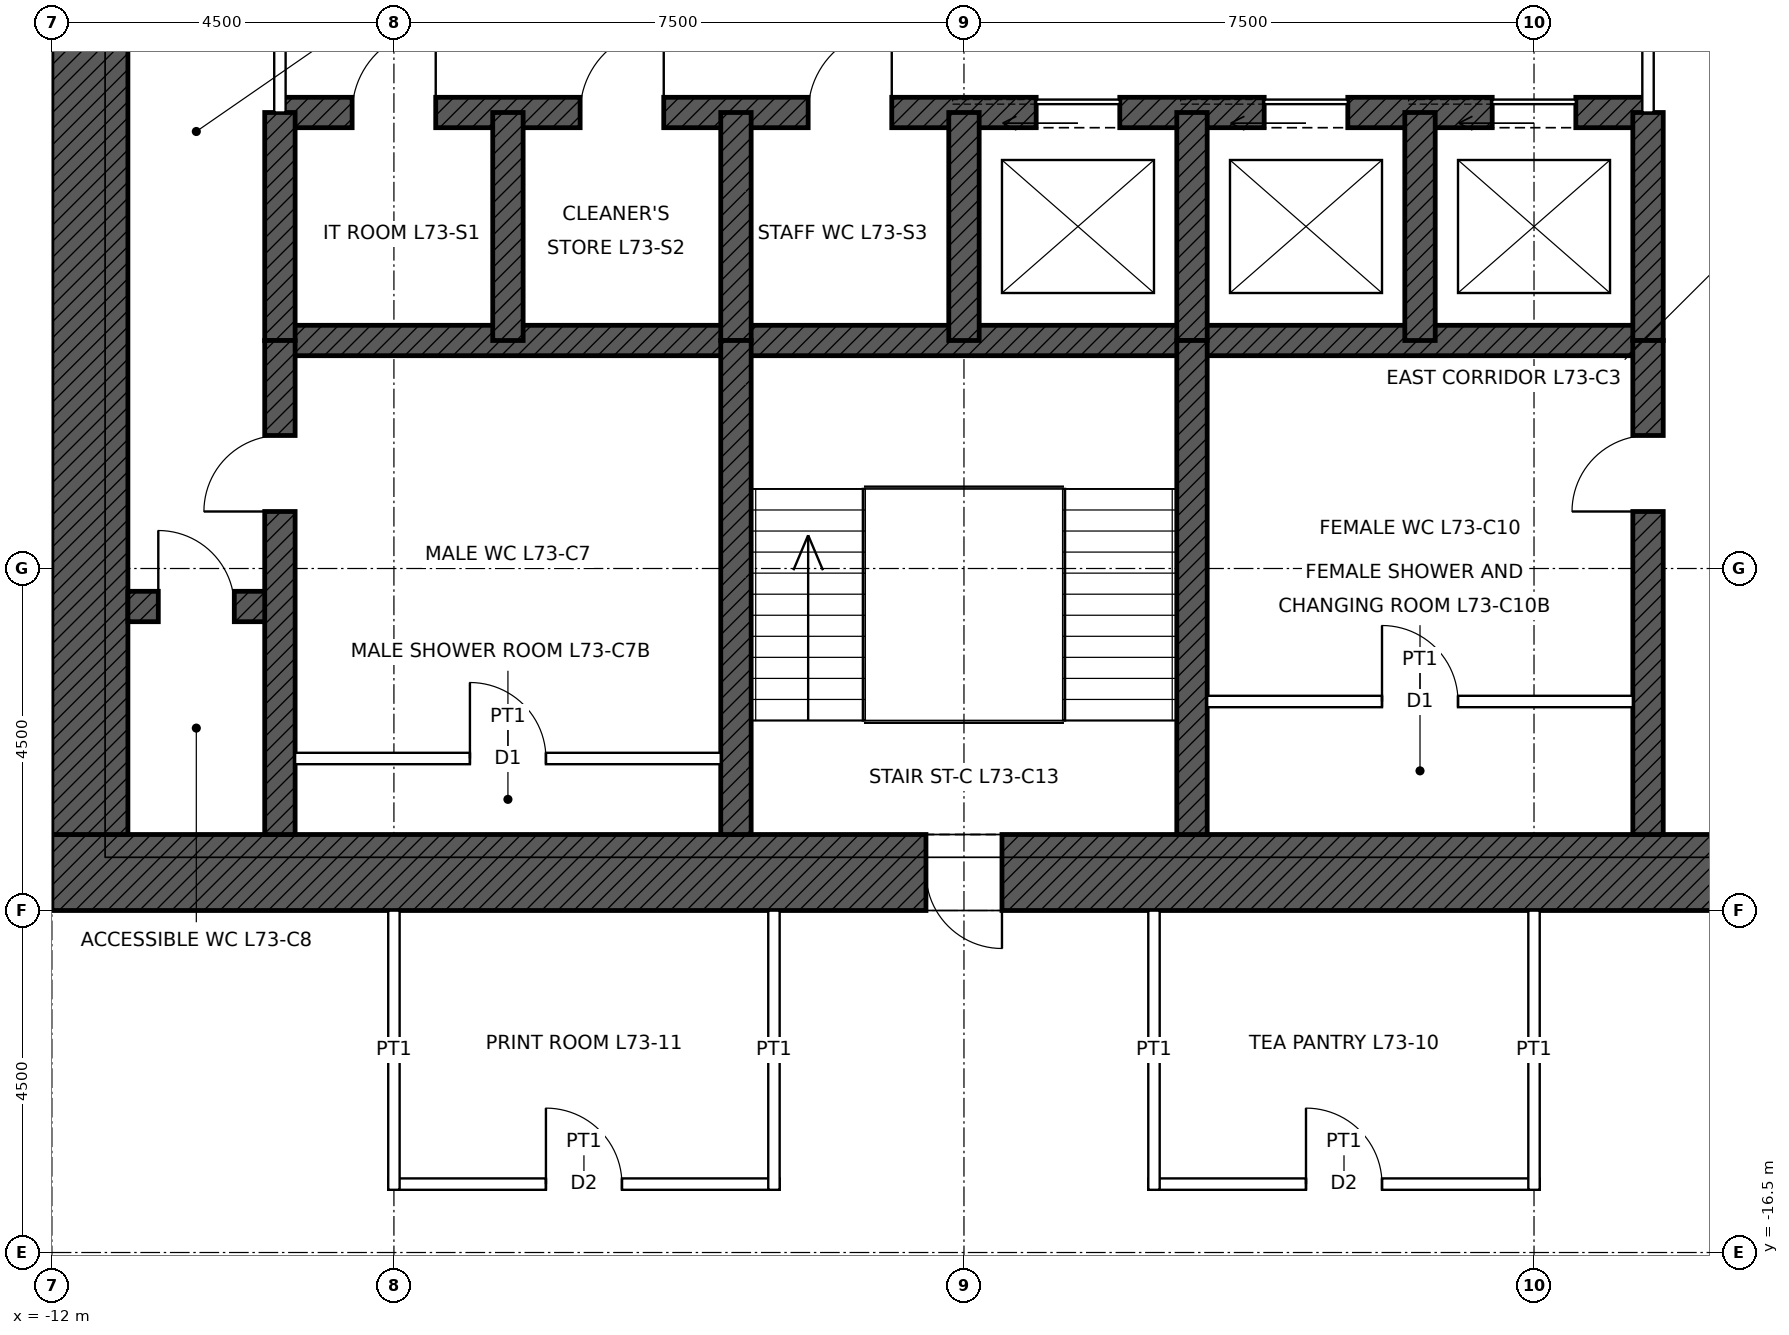
"""IFC4 building model, lengths in metres.
Left out: names, types, materials, properties, quantities, classifications, styles, units other than length and angle.
Written with IfcOpenShell. Run it as: python <this file> out.ifc"""

import sys

from ifc_helpers import new_model, si_unit, direction, frame, frame_2d, origin, place, context, subcontext, project, spatial, rectangle, extrude, element, fill, save


model = new_model("IFC4")
c1 = context("Model", 3, precision=1e-05, world=origin(), true_north=direction((0.0, 1.0)))
c2 = subcontext(c1, "Body", "Model", "MODEL_VIEW")
j1 = project(units=[si_unit("LENGTHUNIT", "METRE"), si_unit("PLANEANGLEUNIT", "RADIAN")], contexts=[c1])
p1 = place(None, origin())
s1 = spatial("IfcSite", under=j1, at=p1, CompositionType="ELEMENT")
p2 = place(p1, origin())
s2 = spatial("IfcBuilding", under=s1, at=p2, CompositionType="ELEMENT")
p3 = place(p2, frame((0.0, 0.0, 327.9)))
s3 = spatial("IfcBuildingStorey", under=s2, at=p3, CompositionType="ELEMENT", Elevation=327.9)
p4 = place(p3, frame((12.0, -11.5, 0.0), z_axis=(0.0, 0.0, 1.0), x_axis=(-1.0, 0.0, 0.0)))
e1 = element("IfcWall", 1, at=p4, inside=s3, PredefinedType="SHEAR", context=c2, shape_type="SweptSolid", body=[
    extrude(rectangle(XDim=24.0, YDim=1.0, at=frame_2d((12.0, 0.0))), origin(), (0.0, 0.0, 1.0), 4.0),
])
p5 = place(p4, frame((11.5, 0.0, 0.0)))
e2 = element("IfcOpeningElement", 2, at=p5, cuts=e1, PredefinedType="OPENING", context=c2, shape_type="SweptSolid", body=[
    extrude(rectangle(XDim=1.0, YDim=2.1, at=frame_2d((0.5, 1.05))), frame((0.0, 0.51, 0.0), z_axis=(0.0, -1.0, 0.0), x_axis=(1.0, 0.0, 0.0)), (0.0, 0.0, 1.0), 1.02),
])
p6 = place(p4, frame((1.0, 0.0, 0.0)))
e3 = element("IfcOpeningElement", 3, at=p6, cuts=e1, PredefinedType="OPENING", context=c2, shape_type="SweptSolid", body=[
    extrude(rectangle(XDim=1.0, YDim=2.4, at=frame_2d((0.5, 1.2))), frame((0.0, 0.51, 0.0), z_axis=(0.0, -1.0, 0.0), x_axis=(1.0, 0.0, 0.0)), (0.0, 0.0, 1.0), 1.02),
])
p7 = place(p3, frame((-11.5, -11.0, 0.0), z_axis=(0.0, 0.0, 1.0), x_axis=(0.0, 1.0, 0.0)))
e4 = element("IfcWall", 4, at=p7, inside=s3, PredefinedType="SHEAR", context=c2, shape_type="SweptSolid", body=[
    extrude(rectangle(XDim=22.0, YDim=1.0, at=frame_2d((11.0, 0.0))), origin(), (0.0, 0.0, 1.0), 4.0),
])
p8 = place(p7, frame((10.5, 0.0, 0.0)))
e5 = element("IfcOpeningElement", 5, at=p8, cuts=e4, PredefinedType="OPENING", context=c2, shape_type="SweptSolid", body=[
    extrude(rectangle(XDim=1.0, YDim=2.4, at=frame_2d((0.5, 1.2))), frame((0.0, 0.51, 0.0), z_axis=(0.0, -1.0, 0.0), x_axis=(1.0, 0.0, 0.0)), (0.0, 0.0, 1.0), 1.02),
])
p9 = place(p3, frame((-9.0, -1.5, 0.0), z_axis=(0.0, 0.0, 1.0), x_axis=(1.0, 0.0, 0.0)))
e6 = element("IfcWall", 6, at=p9, inside=s3, PredefinedType="SHEAR", context=c2, shape_type="SweptSolid", body=[
    extrude(rectangle(XDim=18.0, YDim=0.4, at=frame_2d((9.0, 0.0))), origin(), (0.0, 0.0, 1.0), 4.0),
])
p10 = place(p9, frame((9.95, 0.0, 0.0)))
e7 = element("IfcOpeningElement", 7, at=p10, cuts=e6, PredefinedType="OPENING", context=c2, shape_type="SweptSolid", body=[
    extrude(rectangle(XDim=1.1, YDim=2.1, at=frame_2d((0.55, 1.05))), frame((0.0, 0.21, 0.0), z_axis=(0.0, -1.0, 0.0), x_axis=(1.0, 0.0, 0.0)), (0.0, 0.0, 1.0), 0.42),
])
p11 = place(p9, frame((12.95, 0.0, 0.0)))
e8 = element("IfcOpeningElement", 8, at=p11, cuts=e6, PredefinedType="OPENING", context=c2, shape_type="SweptSolid", body=[
    extrude(rectangle(XDim=1.1, YDim=2.1, at=frame_2d((0.55, 1.05))), frame((0.0, 0.21, 0.0), z_axis=(0.0, -1.0, 0.0), x_axis=(1.0, 0.0, 0.0)), (0.0, 0.0, 1.0), 0.42),
])
p12 = place(p9, frame((15.95, 0.0, 0.0)))
e9 = element("IfcOpeningElement", 9, at=p12, cuts=e6, PredefinedType="OPENING", context=c2, shape_type="SweptSolid", body=[
    extrude(rectangle(XDim=1.1, YDim=2.1, at=frame_2d((0.55, 1.05))), frame((0.0, 0.21, 0.0), z_axis=(0.0, -1.0, 0.0), x_axis=(1.0, 0.0, 0.0)), (0.0, 0.0, 1.0), 0.42),
])
p13 = place(p9, frame((0.95, 0.0, 0.0)))
e10 = element("IfcOpeningElement", 10, at=p13, cuts=e6, PredefinedType="OPENING", context=c2, shape_type="SweptSolid", body=[
    extrude(rectangle(XDim=1.1, YDim=2.1, at=frame_2d((0.55, 1.05))), frame((0.0, 0.21, 0.0), z_axis=(0.0, -1.0, 0.0), x_axis=(1.0, 0.0, 0.0)), (0.0, 0.0, 1.0), 0.42),
])
p14 = place(p9, frame((3.95, 0.0, 0.0)))
e11 = element("IfcOpeningElement", 11, at=p14, cuts=e6, PredefinedType="OPENING", context=c2, shape_type="SweptSolid", body=[
    extrude(rectangle(XDim=1.1, YDim=2.1, at=frame_2d((0.55, 1.05))), frame((0.0, 0.21, 0.0), z_axis=(0.0, -1.0, 0.0), x_axis=(1.0, 0.0, 0.0)), (0.0, 0.0, 1.0), 0.42),
])
p15 = place(p9, frame((6.95, 0.0, 0.0)))
e12 = element("IfcOpeningElement", 12, at=p15, cuts=e6, PredefinedType="OPENING", context=c2, shape_type="SweptSolid", body=[
    extrude(rectangle(XDim=1.1, YDim=2.1, at=frame_2d((0.55, 1.05))), frame((0.0, 0.21, 0.0), z_axis=(0.0, -1.0, 0.0), x_axis=(1.0, 0.0, 0.0)), (0.0, 0.0, 1.0), 0.42),
])
p16 = place(p3, frame((-9.0, -4.5, 0.0), z_axis=(0.0, 0.0, 1.0), x_axis=(1.0, 0.0, 0.0)))
e13 = element("IfcWall", 13, at=p16, inside=s3, PredefinedType="SHEAR", context=c2, shape_type="SweptSolid", body=[
    extrude(rectangle(XDim=18.0, YDim=0.4, at=frame_2d((9.0, 0.0))), origin(), (0.0, 0.0, 1.0), 4.0),
])
p17 = place(p3, frame((-11.0, -8.0, 0.0), z_axis=(0.0, 0.0, 1.0), x_axis=(1.0, 0.0, 0.0)))
e14 = element("IfcWall", 14, at=p17, inside=s3, PredefinedType="SHEAR", context=c2, shape_type="SweptSolid", body=[
    extrude(rectangle(XDim=2.0, YDim=0.4, at=frame_2d((1.0, 0.0))), origin(), (0.0, 0.0, 1.0), 4.0),
])
p18 = place(p17, frame((0.4, 0.0, 0.0)))
e15 = element("IfcOpeningElement", 15, at=p18, cuts=e14, PredefinedType="OPENING", context=c2, shape_type="SweptSolid", body=[
    extrude(rectangle(XDim=1.0, YDim=2.1, at=frame_2d((0.5, 1.05))), frame((0.0, 0.21, 0.0), z_axis=(0.0, -1.0, 0.0), x_axis=(1.0, 0.0, 0.0)), (0.0, 0.0, 1.0), 0.42),
])
for number, where, z_axis, x_axis in (
    (16, (-9.0, -4.5, 0.0), (0.0, 0.0, 1.0), (0.0, 1.0, 0.0)),
    (17, (9.0, -4.5, 0.0), (0.0, 0.0, 1.0), (0.0, 1.0, 0.0)),
    (18, (-6.0, -4.5, 0.0), (0.0, 0.0, 1.0), (0.0, 1.0, 0.0)),
    (19, (-3.0, -4.5, 0.0), (0.0, 0.0, 1.0), (0.0, 1.0, 0.0)),
    (20, (0.0, -4.5, 0.0), (0.0, 0.0, 1.0), (0.0, 1.0, 0.0)),
    (21, (3.0, -4.5, 0.0), (0.0, 0.0, 1.0), (0.0, 1.0, 0.0)),
    (22, (6.0, -4.5, 0.0), (0.0, 0.0, 1.0), (0.0, 1.0, 0.0)),
):
    element("IfcWall", number, at=place(p3, frame(where, z_axis=z_axis, x_axis=x_axis)), inside=s3, PredefinedType="SHEAR", context=c2, shape_type="SweptSolid", body=[
        extrude(rectangle(XDim=3.0, YDim=0.4, at=frame_2d((1.5, 0.0))), origin(), (0.0, 0.0, 1.0), 4.0),
    ])
p19 = place(p3, frame((-9.0, -11.0, 0.0), z_axis=(0.0, 0.0, 1.0), x_axis=(0.0, 1.0, 0.0)))
e23 = element("IfcWall", 23, at=p19, inside=s3, PredefinedType="SHEAR", context=c2, shape_type="SweptSolid", body=[
    extrude(rectangle(XDim=6.5, YDim=0.4, at=frame_2d((3.25, 0.0))), origin(), (0.0, 0.0, 1.0), 4.0),
])
p20 = place(p19, frame((4.25, 0.0, 0.0)))
e24 = element("IfcOpeningElement", 24, at=p20, cuts=e23, PredefinedType="OPENING", context=c2, shape_type="SweptSolid", body=[
    extrude(rectangle(XDim=1.0, YDim=2.1, at=frame_2d((0.5, 1.05))), frame((0.0, 0.21, 0.0), z_axis=(0.0, -1.0, 0.0), x_axis=(1.0, 0.0, 0.0)), (0.0, 0.0, 1.0), 0.42),
])
p21 = place(p3, frame((9.0, -11.0, 0.0), z_axis=(0.0, 0.0, 1.0), x_axis=(0.0, 1.0, 0.0)))
e25 = element("IfcWall", 25, at=p21, inside=s3, PredefinedType="SHEAR", context=c2, shape_type="SweptSolid", body=[
    extrude(rectangle(XDim=6.5, YDim=0.4, at=frame_2d((3.25, 0.0))), origin(), (0.0, 0.0, 1.0), 4.0),
])
p22 = place(p21, frame((4.25, 0.0, 0.0)))
e26 = element("IfcOpeningElement", 26, at=p22, cuts=e25, PredefinedType="OPENING", context=c2, shape_type="SweptSolid", body=[
    extrude(rectangle(XDim=1.0, YDim=2.1, at=frame_2d((0.5, 1.05))), frame((0.0, 0.21, 0.0), z_axis=(0.0, -1.0, 0.0), x_axis=(1.0, 0.0, 0.0)), (0.0, 0.0, 1.0), 0.42),
])
for number, where, z_axis, x_axis in (
    (27, (-3.0, -11.0, 0.0), (0.0, 0.0, 1.0), (0.0, 1.0, 0.0)),
    (28, (3.0, -11.0, 0.0), (0.0, 0.0, 1.0), (0.0, 1.0, 0.0)),
):
    element("IfcWall", number, at=place(p3, frame(where, z_axis=z_axis, x_axis=x_axis)), inside=s3, PredefinedType="SHEAR", context=c2, shape_type="SweptSolid", body=[
        extrude(rectangle(XDim=6.5, YDim=0.4, at=frame_2d((3.25, 0.0))), origin(), (0.0, 0.0, 1.0), 4.0),
    ])
p23 = place(p3, frame((-7.575, -15.6, 0.0), z_axis=(0.0, 0.0, 1.0), x_axis=(1.0, 0.0, 0.0)))
e29 = element("IfcWall", 29, at=p23, inside=s3, PredefinedType="PARTITIONING", context=c2, shape_type="SweptSolid", body=[
    extrude(rectangle(XDim=5.15, YDim=0.15, at=frame_2d((2.575, 0.0))), origin(), (0.0, 0.0, 1.0), 3.85),
])
p24 = place(p23, frame((2.075, 0.0, 0.0)))
e30 = element("IfcOpeningElement", 30, at=p24, cuts=e29, PredefinedType="OPENING", context=c2, shape_type="SweptSolid", body=[
    extrude(rectangle(XDim=1.0, YDim=2.1, at=frame_2d((0.5, 1.05))), frame((0.0, 0.085, 0.0), z_axis=(0.0, -1.0, 0.0), x_axis=(1.0, 0.0, 0.0)), (0.0, 0.0, 1.0), 0.17),
])
p25 = place(p3, frame((2.425, -15.6, 0.0), z_axis=(0.0, 0.0, 1.0), x_axis=(1.0, 0.0, 0.0)))
e31 = element("IfcWall", 31, at=p25, inside=s3, PredefinedType="PARTITIONING", context=c2, shape_type="SweptSolid", body=[
    extrude(rectangle(XDim=5.15, YDim=0.15, at=frame_2d((2.575, 0.0))), origin(), (0.0, 0.0, 1.0), 3.85),
])
p26 = place(p25, frame((2.075, 0.0, 0.0)))
e32 = element("IfcOpeningElement", 32, at=p26, cuts=e31, PredefinedType="OPENING", context=c2, shape_type="SweptSolid", body=[
    extrude(rectangle(XDim=1.0, YDim=2.1, at=frame_2d((0.5, 1.05))), frame((0.0, 0.085, 0.0), z_axis=(0.0, -1.0, 0.0), x_axis=(1.0, 0.0, 0.0)), (0.0, 0.0, 1.0), 0.17),
])
p27 = place(p3, frame((-7.5, -15.675, 0.0), z_axis=(0.0, 0.0, 1.0), x_axis=(0.0, 1.0, 0.0)))
e33 = element("IfcWall", 33, at=p27, inside=s3, PredefinedType="PARTITIONING", context=c2, shape_type="SweptSolid", body=[
    extrude(rectangle(XDim=3.675, YDim=0.15, at=frame_2d((1.837, 0.0))), origin(), (0.0, 0.0, 1.0), 3.243),
])
for number, where, z_axis, x_axis in (
    (34, (-2.5, -15.675, 0.0), (0.0, 0.0, 1.0), (0.0, 1.0, 0.0)),
    (35, (2.5, -15.675, 0.0), (0.0, 0.0, 1.0), (0.0, 1.0, 0.0)),
):
    element("IfcWall", number, at=place(p3, frame(where, z_axis=z_axis, x_axis=x_axis)), inside=s3, PredefinedType="PARTITIONING", context=c2, shape_type="SweptSolid", body=[
        extrude(rectangle(XDim=3.675, YDim=0.15, at=frame_2d((1.837, 0.0))), origin(), (0.0, 0.0, 1.0), 3.85),
    ])
p28 = place(p3, frame((7.5, -15.675, 0.0), z_axis=(0.0, 0.0, 1.0), x_axis=(0.0, 1.0, 0.0)))
e36 = element("IfcWall", 36, at=p28, inside=s3, PredefinedType="PARTITIONING", context=c2, shape_type="SweptSolid", body=[
    extrude(rectangle(XDim=3.675, YDim=0.15, at=frame_2d((1.837, 0.0))), origin(), (0.0, 0.0, 1.0), 3.243),
])
p29 = place(p3, frame((-8.8, -10.0, 0.0), z_axis=(0.0, 0.0, 1.0), x_axis=(1.0, 0.0, 0.0)))
e37 = element("IfcWall", 37, at=p29, inside=s3, PredefinedType="PARTITIONING", context=c2, shape_type="SweptSolid", body=[
    extrude(rectangle(XDim=5.6, YDim=0.15, at=frame_2d((2.8, 0.0))), origin(), (0.0, 0.0, 1.0), 3.75),
])
p30 = place(p29, frame((2.3, 0.0, 0.0)))
e38 = element("IfcOpeningElement", 38, at=p30, cuts=e37, PredefinedType="OPENING", context=c2, shape_type="SweptSolid", body=[
    extrude(rectangle(XDim=1.0, YDim=2.1, at=frame_2d((0.5, 1.05))), frame((0.0, 0.085, 0.0), z_axis=(0.0, -1.0, 0.0), x_axis=(1.0, 0.0, 0.0)), (0.0, 0.0, 1.0), 0.17),
])
p31 = place(p3, frame((3.2, -9.25, 0.0), z_axis=(0.0, 0.0, 1.0), x_axis=(1.0, 0.0, 0.0)))
e39 = element("IfcWall", 39, at=p31, inside=s3, PredefinedType="PARTITIONING", context=c2, shape_type="SweptSolid", body=[
    extrude(rectangle(XDim=5.6, YDim=0.15, at=frame_2d((2.8, 0.0))), origin(), (0.0, 0.0, 1.0), 3.75),
])
p32 = place(p31, frame((2.3, 0.0, 0.0)))
e40 = element("IfcOpeningElement", 40, at=p32, cuts=e39, PredefinedType="OPENING", context=c2, shape_type="SweptSolid", body=[
    extrude(rectangle(XDim=1.0, YDim=2.1, at=frame_2d((0.5, 1.05))), frame((0.0, 0.085, 0.0), z_axis=(0.0, -1.0, 0.0), x_axis=(1.0, 0.0, 0.0)), (0.0, 0.0, 1.0), 0.17),
])
p33 = place(p3, frame((-9.0, -1.5, 0.0), z_axis=(0.0, 0.0, 1.0), x_axis=(0.0, 1.0, 0.0)))
e41 = element("IfcWall", 41, at=p33, inside=s3, PredefinedType="PARTITIONING", context=c2, shape_type="SweptSolid", body=[
    extrude(rectangle(XDim=3.0, YDim=0.15, at=frame_2d((1.5, 0.0))), origin(), (0.0, 0.0, 1.0), 3.75),
])
p34 = place(p33, frame((1.0, 0.0, 0.0)))
e42 = element("IfcOpeningElement", 42, at=p34, cuts=e41, PredefinedType="OPENING", context=c2, shape_type="SweptSolid", body=[
    extrude(rectangle(XDim=1.0, YDim=2.4, at=frame_2d((0.5, 1.2))), frame((0.0, 0.085, 0.0), z_axis=(0.0, -1.0, 0.0), x_axis=(1.0, 0.0, 0.0)), (0.0, 0.0, 1.0), 0.17),
])
p35 = place(p3, frame((9.0, -1.5, 0.0), z_axis=(0.0, 0.0, 1.0), x_axis=(0.0, 1.0, 0.0)))
e43 = element("IfcWall", 43, at=p35, inside=s3, PredefinedType="PARTITIONING", context=c2, shape_type="SweptSolid", body=[
    extrude(rectangle(XDim=3.0, YDim=0.15, at=frame_2d((1.5, 0.0))), origin(), (0.0, 0.0, 1.0), 3.75),
])
p36 = place(p35, frame((1.0, 0.0, 0.0)))
e44 = element("IfcOpeningElement", 44, at=p36, cuts=e43, PredefinedType="OPENING", context=c2, shape_type="SweptSolid", body=[
    extrude(rectangle(XDim=1.0, YDim=2.4, at=frame_2d((0.5, 1.2))), frame((0.0, 0.085, 0.0), z_axis=(0.0, -1.0, 0.0), x_axis=(1.0, 0.0, 0.0)), (0.0, 0.0, 1.0), 0.17),
])
p37 = place(p5, origin())
e45 = element("IfcDoor", 45, at=p37, inside=s3, OperationType="SINGLE_SWING_LEFT", PredefinedType="DOOR", context=c2, shape_type="SweptSolid", body=[
    extrude(rectangle(XDim=1.0, YDim=2.1, at=frame_2d((0.5, 1.05))), frame((0.0, 0.485, 0.0), z_axis=(0.0, -1.0, 0.0), x_axis=(1.0, 0.0, 0.0)), (0.0, 0.0, 1.0), 0.05),
])
fill(e2, e45)
p38 = place(p20, origin())
e46 = element("IfcDoor", 46, at=p38, inside=s3, OperationType="SINGLE_SWING_LEFT", PredefinedType="DOOR", context=c2, shape_type="SweptSolid", body=[
    extrude(rectangle(XDim=1.0, YDim=2.1, at=frame_2d((0.5, 1.05))), frame((0.0, 0.025, 0.0), z_axis=(0.0, -1.0, 0.0), x_axis=(1.0, 0.0, 0.0)), (0.0, 0.0, 1.0), 0.05),
])
fill(e24, e46)
p39 = place(p22, origin())
e47 = element("IfcDoor", 47, at=p39, inside=s3, OperationType="SINGLE_SWING_LEFT", PredefinedType="DOOR", context=c2, shape_type="SweptSolid", body=[
    extrude(rectangle(XDim=1.0, YDim=2.1, at=frame_2d((0.5, 1.05))), frame((0.0, 0.025, 0.0), z_axis=(0.0, -1.0, 0.0), x_axis=(1.0, 0.0, 0.0)), (0.0, 0.0, 1.0), 0.05),
])
fill(e26, e47)
p40 = place(p18, origin())
e48 = element("IfcDoor", 48, at=p40, inside=s3, OperationType="SINGLE_SWING_LEFT", PredefinedType="DOOR", context=c2, shape_type="SweptSolid", body=[
    extrude(rectangle(XDim=1.0, YDim=2.1, at=frame_2d((0.5, 1.05))), frame((0.0, 0.025, 0.0), z_axis=(0.0, -1.0, 0.0), x_axis=(1.0, 0.0, 0.0)), (0.0, 0.0, 1.0), 0.05),
])
fill(e15, e48)
p41 = place(p10, origin())
e49 = element("IfcDoor", 49, at=p41, inside=s3, OperationType="SLIDING_TO_LEFT", PredefinedType="DOOR", context=c2, shape_type="SweptSolid", body=[
    extrude(rectangle(XDim=1.1, YDim=2.1, at=frame_2d((0.55, 1.05))), frame((0.0, 0.025, 0.0), z_axis=(0.0, -1.0, 0.0), x_axis=(1.0, 0.0, 0.0)), (0.0, 0.0, 1.0), 0.05),
])
fill(e7, e49)
p42 = place(p11, origin())
e50 = element("IfcDoor", 50, at=p42, inside=s3, OperationType="SLIDING_TO_LEFT", PredefinedType="DOOR", context=c2, shape_type="SweptSolid", body=[
    extrude(rectangle(XDim=1.1, YDim=2.1, at=frame_2d((0.55, 1.05))), frame((0.0, 0.025, 0.0), z_axis=(0.0, -1.0, 0.0), x_axis=(1.0, 0.0, 0.0)), (0.0, 0.0, 1.0), 0.05),
])
fill(e8, e50)
p43 = place(p12, origin())
e51 = element("IfcDoor", 51, at=p43, inside=s3, OperationType="SLIDING_TO_LEFT", PredefinedType="DOOR", context=c2, shape_type="SweptSolid", body=[
    extrude(rectangle(XDim=1.1, YDim=2.1, at=frame_2d((0.55, 1.05))), frame((0.0, 0.025, 0.0), z_axis=(0.0, -1.0, 0.0), x_axis=(1.0, 0.0, 0.0)), (0.0, 0.0, 1.0), 0.05),
])
fill(e9, e51)
p44 = place(p30, origin())
e52 = element("IfcDoor", 52, at=p44, inside=s3, OperationType="SINGLE_SWING_LEFT", PredefinedType="DOOR", context=c2, shape_type="SweptSolid", body=[
    extrude(rectangle(XDim=1.0, YDim=2.1, at=frame_2d((0.5, 1.05))), frame((0.0, 0.025, 0.0), z_axis=(0.0, -1.0, 0.0), x_axis=(1.0, 0.0, 0.0)), (0.0, 0.0, 1.0), 0.05),
])
fill(e38, e52)
p45 = place(p32, origin())
e53 = element("IfcDoor", 53, at=p45, inside=s3, OperationType="SINGLE_SWING_LEFT", PredefinedType="DOOR", context=c2, shape_type="SweptSolid", body=[
    extrude(rectangle(XDim=1.0, YDim=2.1, at=frame_2d((0.5, 1.05))), frame((0.0, 0.025, 0.0), z_axis=(0.0, -1.0, 0.0), x_axis=(1.0, 0.0, 0.0)), (0.0, 0.0, 1.0), 0.05),
])
fill(e40, e53)
p46 = place(p13, origin())
e54 = element("IfcDoor", 54, at=p46, inside=s3, OperationType="SINGLE_SWING_RIGHT", PredefinedType="DOOR", context=c2, shape_type="SweptSolid", body=[
    extrude(rectangle(XDim=1.1, YDim=2.1, at=frame_2d((0.55, 1.05))), frame((0.0, 0.025, 0.0), z_axis=(0.0, -1.0, 0.0), x_axis=(1.0, 0.0, 0.0)), (0.0, 0.0, 1.0), 0.05),
])
fill(e10, e54)
p47 = place(p14, origin())
e55 = element("IfcDoor", 55, at=p47, inside=s3, OperationType="SINGLE_SWING_RIGHT", PredefinedType="DOOR", context=c2, shape_type="SweptSolid", body=[
    extrude(rectangle(XDim=1.1, YDim=2.1, at=frame_2d((0.55, 1.05))), frame((0.0, 0.025, 0.0), z_axis=(0.0, -1.0, 0.0), x_axis=(1.0, 0.0, 0.0)), (0.0, 0.0, 1.0), 0.05),
])
fill(e11, e55)
p48 = place(p15, origin())
e56 = element("IfcDoor", 56, at=p48, inside=s3, OperationType="SINGLE_SWING_RIGHT", PredefinedType="DOOR", context=c2, shape_type="SweptSolid", body=[
    extrude(rectangle(XDim=1.1, YDim=2.1, at=frame_2d((0.55, 1.05))), frame((0.0, 0.025, 0.0), z_axis=(0.0, -1.0, 0.0), x_axis=(1.0, 0.0, 0.0)), (0.0, 0.0, 1.0), 0.05),
])
fill(e12, e56)
p49 = place(p26, origin())
e57 = element("IfcDoor", 57, at=p49, inside=s3, OperationType="SINGLE_SWING_LEFT", PredefinedType="DOOR", context=c2, shape_type="SweptSolid", body=[
    extrude(rectangle(XDim=1.0, YDim=2.1, at=frame_2d((0.5, 1.05))), frame((0.0, 0.025, 0.0), z_axis=(0.0, -1.0, 0.0), x_axis=(1.0, 0.0, 0.0)), (0.0, 0.0, 1.0), 0.05),
])
fill(e32, e57)
p50 = place(p24, origin())
e58 = element("IfcDoor", 58, at=p50, inside=s3, OperationType="SINGLE_SWING_LEFT", PredefinedType="DOOR", context=c2, shape_type="SweptSolid", body=[
    extrude(rectangle(XDim=1.0, YDim=2.1, at=frame_2d((0.5, 1.05))), frame((0.0, 0.025, 0.0), z_axis=(0.0, -1.0, 0.0), x_axis=(1.0, 0.0, 0.0)), (0.0, 0.0, 1.0), 0.05),
])
fill(e30, e58)
save(model, sys.argv[1])
